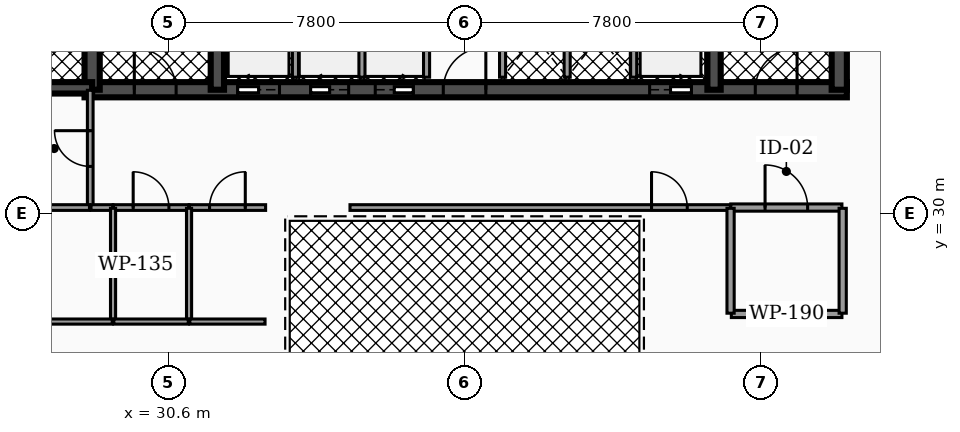
"""IFC4 building model, lengths in metres.
Left out: names, types, materials, properties, quantities, classifications, styles, units other than length and angle.
Written with IfcOpenShell. Run it as: python <this file> out.ifc"""

import sys

from ifc_helpers import new_model, si_unit, direction, frame, frame_2d, origin, place, context, subcontext, project, spatial, rectangle, extrude, element, fill, save


model = new_model("IFC4")
c1 = context("Model", 3, precision=1e-05, world=origin(), true_north=direction((0.0, 1.0)))
c2 = subcontext(c1, "Body", "Model", "MODEL_VIEW")
j1 = project(units=[si_unit("LENGTHUNIT", "METRE"), si_unit("PLANEANGLEUNIT", "RADIAN")], contexts=[c1])
p1 = place(None, origin())
s1 = spatial("IfcSite", under=j1, at=p1, CompositionType="ELEMENT")
p2 = place(p1, origin())
s2 = spatial("IfcBuilding", under=s1, at=p2, CompositionType="ELEMENT")
p3 = place(p2, frame((0.0, 0.0, 119.0)))
s3 = spatial("IfcBuildingStorey", under=s2, at=p3, CompositionType="ELEMENT", Elevation=119.0)
p4 = place(p3, frame((28.4, 33.25, 0.0), z_axis=(0.0, 0.0, 1.0), x_axis=(1.0, 0.0, 0.0)))
e1 = element("IfcWall", 1, at=p4, inside=s3, PredefinedType="SHEAR", context=c2, shape_type="SweptSolid", body=[
    extrude(rectangle(XDim=20.06, YDim=0.4, at=frame_2d((10.03, 0.0))), origin(), (0.0, 0.0, 1.0), 4.18),
])
p5 = place(p4, frame((4.03, 0.0, 0.0)))
e2 = element("IfcOpeningElement", 2, at=p5, cuts=e1, PredefinedType="OPENING", context=c2, shape_type="SweptSolid", body=[
    extrude(rectangle(XDim=1.1, YDim=2.15, at=frame_2d((0.55, 1.075))), frame((0.0, 0.21, 0.0), z_axis=(0.0, -1.0, 0.0), x_axis=(1.0, 0.0, 0.0)), (0.0, 0.0, 1.0), 0.42),
])
p6 = place(p4, frame((14.87, 0.0, 0.0)))
e3 = element("IfcOpeningElement", 3, at=p6, cuts=e1, PredefinedType="OPENING", context=c2, shape_type="SweptSolid", body=[
    extrude(rectangle(XDim=1.1, YDim=2.15, at=frame_2d((0.55, 1.075))), frame((0.0, 0.21, 0.0), z_axis=(0.0, -1.0, 0.0), x_axis=(1.0, 0.0, 0.0)), (0.0, 0.0, 1.0), 0.42),
])
p7 = place(p4, frame((5.95, 0.0, 0.0)))
e4 = element("IfcOpeningElement", 4, at=p7, cuts=e1, PredefinedType="OPENING", context=c2, shape_type="SweptSolid", body=[
    extrude(rectangle(XDim=1.0, YDim=2.1, at=frame_2d((0.5, 1.05))), frame((0.0, 0.21, 0.0), z_axis=(0.0, -1.0, 0.0), x_axis=(1.0, 0.0, 0.0)), (0.0, 0.0, 1.0), 0.42),
])
p8 = place(p4, frame((7.65, 0.0, 0.0)))
e5 = element("IfcOpeningElement", 5, at=p8, cuts=e1, PredefinedType="OPENING", context=c2, shape_type="SweptSolid", body=[
    extrude(rectangle(XDim=1.0, YDim=2.1, at=frame_2d((0.5, 1.05))), frame((0.0, 0.21, 0.0), z_axis=(0.0, -1.0, 0.0), x_axis=(1.0, 0.0, 0.0)), (0.0, 0.0, 1.0), 0.42),
])
p9 = place(p4, frame((1.31, 0.0, 0.0)))
e6 = element("IfcOpeningElement", 6, at=p9, cuts=e1, PredefinedType="OPENING", context=c2, shape_type="SweptSolid", body=[
    extrude(rectangle(XDim=1.1, YDim=2.2, at=frame_2d((0.55, 1.1))), frame((0.0, 0.21, 0.0), z_axis=(0.0, -1.0, 0.0), x_axis=(1.0, 0.0, 0.0)), (0.0, 0.0, 1.0), 0.42),
])
p10 = place(p4, frame((9.44, 0.0, 0.0)))
e7 = element("IfcOpeningElement", 7, at=p10, cuts=e1, PredefinedType="OPENING", context=c2, shape_type="SweptSolid", body=[
    extrude(rectangle(XDim=1.12, YDim=2.05, at=frame_2d((0.56, 1.025))), frame((0.0, 0.21, 0.0), z_axis=(0.0, -1.0, 0.0), x_axis=(1.0, 0.0, 0.0)), (0.0, 0.0, 1.0), 0.42),
])
p11 = place(p4, frame((17.65, 0.0, 0.0)))
e8 = element("IfcOpeningElement", 8, at=p11, cuts=e1, PredefinedType="OPENING", context=c2, shape_type="SweptSolid", body=[
    extrude(rectangle(XDim=1.1, YDim=2.2, at=frame_2d((0.55, 1.1))), frame((0.0, 0.21, 0.0), z_axis=(0.0, -1.0, 0.0), x_axis=(1.0, 0.0, 0.0)), (0.0, 0.0, 1.0), 0.42),
])
p12 = place(p3, frame((28.6, 33.25, 0.0), z_axis=(0.0, 0.0, 1.0), x_axis=(0.0, 1.0, 0.0)))
e9 = element("IfcWall", 9, at=p12, inside=s3, PredefinedType="SHEAR", context=c2, shape_type="SweptSolid", body=[
    extrude(rectangle(XDim=10.2, YDim=0.4, at=frame_2d((5.1, 0.0))), origin(), (0.0, 0.0, 1.0), 4.18),
])
for number, where, z_axis, x_axis in (
    (10, (31.895, 33.25, 0.0), (0.0, 0.0, 1.0), (0.0, 1.0, 0.0)),
    (11, (44.965, 33.25, 0.0), (0.0, 0.0, 1.0), (0.0, 1.0, 0.0)),
):
    element("IfcWall", number, at=place(p3, frame(where, z_axis=z_axis, x_axis=x_axis)), inside=s3, PredefinedType="SHEAR", context=c2, shape_type="SweptSolid", body=[
        extrude(rectangle(XDim=10.2, YDim=0.35, at=frame_2d((5.1, 0.0))), origin(), (0.0, 0.0, 1.0), 4.18),
    ])
p13 = place(p3, frame((48.26, 33.25, 0.0), z_axis=(0.0, 0.0, 1.0), x_axis=(0.0, 1.0, 0.0)))
e12 = element("IfcWall", 12, at=p13, inside=s3, PredefinedType="SHEAR", context=c2, shape_type="SweptSolid", body=[
    extrude(rectangle(XDim=10.2, YDim=0.4, at=frame_2d((5.1, 0.0))), origin(), (0.0, 0.0, 1.0), 4.18),
])
p14 = place(p3, frame((25.08, 33.3, 0.0), z_axis=(0.0, 0.0, 1.0), x_axis=(1.0, 0.0, 0.0)))
e13 = element("IfcWall", 13, at=p14, inside=s3, PredefinedType="SHEAR", context=c2, shape_type="SweptSolid", body=[
    extrude(rectangle(XDim=3.52, YDim=0.3, at=frame_2d((1.76, 0.0))), origin(), (0.0, 0.0, 1.0), 4.18),
])
p15 = place(p14, frame((1.335, 0.0, 0.0)))
e14 = element("IfcOpeningElement", 14, at=p15, cuts=e13, PredefinedType="OPENING", context=c2, shape_type="SweptSolid", body=[
    extrude(rectangle(XDim=0.95, YDim=2.2, at=frame_2d((0.475, 1.1))), frame((0.0, 0.16, 0.0), z_axis=(0.0, -1.0, 0.0), x_axis=(1.0, 0.0, 0.0)), (0.0, 0.0, 1.0), 0.32),
])
for number, where, z_axis, x_axis in (
    (15, (33.95, 33.58, 0.0), (0.0, 0.0, 1.0), (0.0, 1.0, 0.0)),
    (16, (42.85, 33.58, 0.0), (0.0, 0.0, 1.0), (0.0, 1.0, 0.0)),
):
    element("IfcWall", number, at=place(p3, frame(where, z_axis=z_axis, x_axis=x_axis)), inside=s3, PredefinedType="SOLIDWALL", context=c2, shape_type="SweptSolid", body=[
        extrude(rectangle(XDim=2.45, YDim=0.16, at=frame_2d((1.225, 0.0))), origin(), (0.0, 0.0, 1.0), 3.152),
    ])
for number, where, z_axis, x_axis in (
    (17, (35.7, 33.58, 0.0), (0.0, 0.0, 1.0), (0.0, 1.0, 0.0)),
    (18, (37.4, 33.58, 0.0), (0.0, 0.0, 1.0), (0.0, 1.0, 0.0)),
    (19, (39.4, 33.58, 0.0), (0.0, 0.0, 1.0), (0.0, 1.0, 0.0)),
    (20, (41.1, 33.58, 0.0), (0.0, 0.0, 1.0), (0.0, 1.0, 0.0)),
):
    element("IfcWall", number, at=place(p3, frame(where, z_axis=z_axis, x_axis=x_axis)), inside=s3, PredefinedType="SOLIDWALL", context=c2, shape_type="SweptSolid", body=[
        extrude(rectangle(XDim=2.25, YDim=0.16, at=frame_2d((1.125, 0.0))), origin(), (0.0, 0.0, 1.0), 3.152),
    ])
p16 = place(p3, frame((45.405, 30.15, 0.0), z_axis=(0.0, 0.0, 1.0), x_axis=(1.0, 0.0, 0.0)))
e21 = element("IfcWall", 21, at=p16, inside=s3, PredefinedType="PARTITIONING", context=c2, shape_type="SweptSolid", body=[
    extrude(rectangle(XDim=2.925, YDim=0.19, at=frame_2d((1.462, 0.0))), origin(), (0.0, 0.0, 1.0), 3.137),
])
p17 = place(p16, frame((0.903, 0.0, 0.0)))
e22 = element("IfcOpeningElement", 22, at=p17, cuts=e21, PredefinedType="OPENING", context=c2, shape_type="SweptSolid", body=[
    extrude(rectangle(XDim=1.12, YDim=2.05, at=frame_2d((0.56, 1.025))), frame((0.0, 0.105, 0.0), z_axis=(0.0, -1.0, 0.0), x_axis=(1.0, 0.0, 0.0)), (0.0, 0.0, 1.0), 0.21),
])
p18 = place(p3, frame((28.55, 30.17, 0.0), z_axis=(0.0, 0.0, 1.0), x_axis=(0.0, 1.0, 0.0)))
e23 = element("IfcWall", 23, at=p18, inside=s3, PredefinedType="PARTITIONING", context=c2, shape_type="SweptSolid", body=[
    extrude(rectangle(XDim=3.065, YDim=0.15, at=frame_2d((1.533, 0.0))), origin(), (0.0, 0.0, 1.0), 3.137),
])
p19 = place(p18, frame((1.062, 0.0, 0.0)))
e24 = element("IfcOpeningElement", 24, at=p19, cuts=e23, PredefinedType="OPENING", context=c2, shape_type="SweptSolid", body=[
    extrude(rectangle(XDim=0.94, YDim=2.05, at=frame_2d((0.47, 1.025))), frame((0.0, 0.085, 0.0), z_axis=(0.0, -1.0, 0.0), x_axis=(1.0, 0.0, 0.0)), (0.0, 0.0, 1.0), 0.17),
])
p20 = place(p3, frame((28.57, 30.15, 0.0), z_axis=(0.0, 0.0, 1.0), x_axis=(1.0, 0.0, 0.0)))
e25 = element("IfcWall", 25, at=p20, inside=s3, PredefinedType="PARTITIONING", context=c2, shape_type="SweptSolid", body=[
    extrude(rectangle(XDim=0.575, YDim=0.15, at=frame_2d((0.288, 0.0))), origin(), (0.0, 0.0, 1.0), 3.137),
])
p21 = place(p3, frame((29.155, 30.15, 0.0), z_axis=(0.0, 0.0, 1.0), x_axis=(1.0, 0.0, 0.0)))
e26 = element("IfcWall", 26, at=p21, inside=s3, PredefinedType="PARTITIONING", context=c2, shape_type="SweptSolid", body=[
    extrude(rectangle(XDim=1.99, YDim=0.15, at=frame_2d((0.995, 0.0))), origin(), (0.0, 0.0, 1.0), 3.137),
])
p22 = place(p21, frame((0.525, 0.0, 0.0)))
e27 = element("IfcOpeningElement", 27, at=p22, cuts=e26, PredefinedType="OPENING", context=c2, shape_type="SweptSolid", body=[
    extrude(rectangle(XDim=0.94, YDim=2.05, at=frame_2d((0.47, 1.025))), frame((0.0, 0.085, 0.0), z_axis=(0.0, -1.0, 0.0), x_axis=(1.0, 0.0, 0.0)), (0.0, 0.0, 1.0), 0.17),
])
p23 = place(p3, frame((31.155, 30.15, 0.0), z_axis=(0.0, 0.0, 1.0), x_axis=(1.0, 0.0, 0.0)))
e28 = element("IfcWall", 28, at=p23, inside=s3, PredefinedType="PARTITIONING", context=c2, shape_type="SweptSolid", body=[
    extrude(rectangle(XDim=2.01, YDim=0.15, at=frame_2d((1.005, 0.0))), origin(), (0.0, 0.0, 1.0), 3.137),
])
p24 = place(p23, frame((0.535, 0.0, 0.0)))
e29 = element("IfcOpeningElement", 29, at=p24, cuts=e28, PredefinedType="OPENING", context=c2, shape_type="SweptSolid", body=[
    extrude(rectangle(XDim=0.94, YDim=2.05, at=frame_2d((0.47, 1.025))), frame((0.0, 0.085, 0.0), z_axis=(0.0, -1.0, 0.0), x_axis=(1.0, 0.0, 0.0)), (0.0, 0.0, 1.0), 0.17),
])
p25 = place(p3, frame((35.385, 30.15, 0.0), z_axis=(0.0, 0.0, 1.0), x_axis=(1.0, 0.0, 0.0)))
e30 = element("IfcWall", 30, at=p25, inside=s3, PredefinedType="PARTITIONING", context=c2, shape_type="SweptSolid", body=[
    extrude(rectangle(XDim=10.01, YDim=0.15, at=frame_2d((5.005, 0.0))), origin(), (0.0, 0.0, 1.0), 3.137),
])
p26 = place(p25, frame((7.935, 0.0, 0.0)))
e31 = element("IfcOpeningElement", 31, at=p26, cuts=e30, PredefinedType="OPENING", context=c2, shape_type="SweptSolid", body=[
    extrude(rectangle(XDim=0.94, YDim=2.05, at=frame_2d((0.47, 1.025))), frame((0.0, 0.085, 0.0), z_axis=(0.0, -1.0, 0.0), x_axis=(1.0, 0.0, 0.0)), (0.0, 0.0, 1.0), 0.17),
])
p27 = place(p3, frame((45.42, 27.35, 0.0), z_axis=(0.0, 0.0, 1.0), x_axis=(1.0, 0.0, 0.0)))
e32 = element("IfcWall", 32, at=p27, inside=s3, PredefinedType="PARTITIONING", context=c2, shape_type="SweptSolid", body=[
    extrude(rectangle(XDim=2.91, YDim=0.19, at=frame_2d((1.455, 0.0))), origin(), (0.0, 0.0, 1.0), 3.137),
])
for number, where, z_axis, x_axis in (
    (33, (45.4, 27.37, 0.0), (0.0, 0.0, 1.0), (0.0, 1.0, 0.0)),
    (34, (48.35, 27.37, 0.0), (0.0, 0.0, 1.0), (0.0, 1.0, 0.0)),
):
    element("IfcWall", number, at=place(p3, frame(where, z_axis=z_axis, x_axis=x_axis)), inside=s3, PredefinedType="PARTITIONING", context=c2, shape_type="SweptSolid", body=[
        extrude(rectangle(XDim=2.76, YDim=0.19, at=frame_2d((1.38, 0.0))), origin(), (0.0, 0.0, 1.0), 3.137),
    ])
p28 = place(p3, frame((27.155, 30.15, 0.0), z_axis=(0.0, 0.0, 1.0), x_axis=(1.0, 0.0, 0.0)))
e35 = element("IfcWall", 35, at=p28, inside=s3, PredefinedType="PARTITIONING", context=c2, shape_type="SweptSolid", body=[
    extrude(rectangle(XDim=1.375, YDim=0.15, at=frame_2d((0.688, 0.0))), origin(), (0.0, 0.0, 1.0), 3.137),
])
p29 = place(p3, frame((29.15, 27.17, 0.0), z_axis=(0.0, 0.0, 1.0), x_axis=(0.0, 1.0, 0.0)))
e36 = element("IfcWall", 36, at=p29, inside=s3, PredefinedType="PARTITIONING", context=c2, shape_type="SweptSolid", body=[
    extrude(rectangle(XDim=2.96, YDim=0.135, at=frame_2d((1.48, 0.0))), origin(), (0.0, 0.0, 1.0), 3.137),
])
p30 = place(p3, frame((27.17, 27.15, 0.0), z_axis=(0.0, 0.0, 1.0), x_axis=(1.0, 0.0, 0.0)))
e37 = element("IfcWall", 37, at=p30, inside=s3, PredefinedType="PARTITIONING", context=c2, shape_type="SweptSolid", body=[
    extrude(rectangle(XDim=1.96, YDim=0.135, at=frame_2d((0.98, 0.0))), origin(), (0.0, 0.0, 1.0), 3.137),
])
p31 = place(p3, frame((31.15, 27.17, 0.0), z_axis=(0.0, 0.0, 1.0), x_axis=(0.0, 1.0, 0.0)))
e38 = element("IfcWall", 38, at=p31, inside=s3, PredefinedType="PARTITIONING", context=c2, shape_type="SweptSolid", body=[
    extrude(rectangle(XDim=2.96, YDim=0.135, at=frame_2d((1.48, 0.0))), origin(), (0.0, 0.0, 1.0), 3.137),
])
p32 = place(p3, frame((29.17, 27.15, 0.0), z_axis=(0.0, 0.0, 1.0), x_axis=(1.0, 0.0, 0.0)))
e39 = element("IfcWall", 39, at=p32, inside=s3, PredefinedType="PARTITIONING", context=c2, shape_type="SweptSolid", body=[
    extrude(rectangle(XDim=1.96, YDim=0.135, at=frame_2d((0.98, 0.0))), origin(), (0.0, 0.0, 1.0), 3.137),
])
p33 = place(p3, frame((31.17, 27.15, 0.0), z_axis=(0.0, 0.0, 1.0), x_axis=(1.0, 0.0, 0.0)))
e40 = element("IfcWall", 40, at=p33, inside=s3, PredefinedType="PARTITIONING", context=c2, shape_type="SweptSolid", body=[
    extrude(rectangle(XDim=1.98, YDim=0.135, at=frame_2d((0.99, 0.0))), origin(), (0.0, 0.0, 1.0), 3.137),
])
p34 = place(p5, origin())
e41 = element("IfcDoor", 41, at=p34, inside=s3, OperationType="SLIDING_TO_LEFT", PredefinedType="DOOR", context=c2, shape_type="SweptSolid", body=[
    extrude(rectangle(XDim=1.1, YDim=2.15, at=frame_2d((0.55, 1.075))), frame((0.0, 0.025, 0.0), z_axis=(0.0, -1.0, 0.0), x_axis=(1.0, 0.0, 0.0)), (0.0, 0.0, 1.0), 0.05),
])
fill(e2, e41)
p35 = place(p6, origin())
e42 = element("IfcDoor", 42, at=p35, inside=s3, OperationType="SLIDING_TO_RIGHT", PredefinedType="DOOR", context=c2, shape_type="SweptSolid", body=[
    extrude(rectangle(XDim=1.1, YDim=2.15, at=frame_2d((0.55, 1.075))), frame((0.0, 0.025, 0.0), z_axis=(0.0, -1.0, 0.0), x_axis=(1.0, 0.0, 0.0)), (0.0, 0.0, 1.0), 0.05),
])
fill(e3, e42)
p36 = place(p7, origin())
e43 = element("IfcDoor", 43, at=p36, inside=s3, OperationType="SLIDING_TO_LEFT", PredefinedType="DOOR", context=c2, shape_type="SweptSolid", body=[
    extrude(rectangle(XDim=1.0, YDim=2.1, at=frame_2d((0.5, 1.05))), frame((0.0, 0.025, 0.0), z_axis=(0.0, -1.0, 0.0), x_axis=(1.0, 0.0, 0.0)), (0.0, 0.0, 1.0), 0.05),
])
fill(e4, e43)
p37 = place(p8, origin())
e44 = element("IfcDoor", 44, at=p37, inside=s3, OperationType="SLIDING_TO_RIGHT", PredefinedType="DOOR", context=c2, shape_type="SweptSolid", body=[
    extrude(rectangle(XDim=1.0, YDim=2.1, at=frame_2d((0.5, 1.05))), frame((0.0, 0.025, 0.0), z_axis=(0.0, -1.0, 0.0), x_axis=(1.0, 0.0, 0.0)), (0.0, 0.0, 1.0), 0.05),
])
fill(e5, e44)
p38 = place(p9, origin())
e45 = element("IfcDoor", 45, at=p38, inside=s3, OperationType="SINGLE_SWING_LEFT", PredefinedType="DOOR", context=c2, shape_type="SweptSolid", body=[
    extrude(rectangle(XDim=1.1, YDim=2.2, at=frame_2d((0.55, 1.1))), frame((0.0, 0.025, 0.0), z_axis=(0.0, -1.0, 0.0), x_axis=(1.0, 0.0, 0.0)), (0.0, 0.0, 1.0), 0.05),
])
fill(e6, e45)
p39 = place(p10, origin())
e46 = element("IfcDoor", 46, at=p39, inside=s3, OperationType="SINGLE_SWING_RIGHT", PredefinedType="DOOR", context=c2, shape_type="SweptSolid", body=[
    extrude(rectangle(XDim=1.12, YDim=2.05, at=frame_2d((0.56, 1.025))), frame((0.0, 0.025, 0.0), z_axis=(0.0, -1.0, 0.0), x_axis=(1.0, 0.0, 0.0)), (0.0, 0.0, 1.0), 0.05),
])
fill(e7, e46)
p40 = place(p11, origin())
e47 = element("IfcDoor", 47, at=p40, inside=s3, OperationType="SINGLE_SWING_RIGHT", PredefinedType="DOOR", context=c2, shape_type="SweptSolid", body=[
    extrude(rectangle(XDim=1.1, YDim=2.2, at=frame_2d((0.55, 1.1))), frame((0.0, 0.025, 0.0), z_axis=(0.0, -1.0, 0.0), x_axis=(1.0, 0.0, 0.0)), (0.0, 0.0, 1.0), 0.05),
])
fill(e8, e47)
p41 = place(p17, origin())
e48 = element("IfcDoor", 48, at=p41, inside=s3, OperationType="SINGLE_SWING_LEFT", PredefinedType="DOOR", context=c2, shape_type="SweptSolid", body=[
    extrude(rectangle(XDim=1.12, YDim=2.05, at=frame_2d((0.56, 1.025))), frame((0.0, 0.025, 0.0), z_axis=(0.0, -1.0, 0.0), x_axis=(1.0, 0.0, 0.0)), (0.0, 0.0, 1.0), 0.05),
])
fill(e22, e48)
p42 = place(p19, origin())
e49 = element("IfcDoor", 49, at=p42, inside=s3, OperationType="SINGLE_SWING_RIGHT", PredefinedType="DOOR", context=c2, shape_type="SweptSolid", body=[
    extrude(rectangle(XDim=0.94, YDim=2.05, at=frame_2d((0.47, 1.025))), frame((0.0, 0.025, 0.0), z_axis=(0.0, -1.0, 0.0), x_axis=(1.0, 0.0, 0.0)), (0.0, 0.0, 1.0), 0.05),
])
fill(e24, e49)
p43 = place(p22, origin())
e50 = element("IfcDoor", 50, at=p43, inside=s3, OperationType="SINGLE_SWING_LEFT", PredefinedType="DOOR", context=c2, shape_type="SweptSolid", body=[
    extrude(rectangle(XDim=0.94, YDim=2.05, at=frame_2d((0.47, 1.025))), frame((0.0, 0.025, 0.0), z_axis=(0.0, -1.0, 0.0), x_axis=(1.0, 0.0, 0.0)), (0.0, 0.0, 1.0), 0.05),
])
fill(e27, e50)
p44 = place(p24, origin())
e51 = element("IfcDoor", 51, at=p44, inside=s3, OperationType="SINGLE_SWING_RIGHT", PredefinedType="DOOR", context=c2, shape_type="SweptSolid", body=[
    extrude(rectangle(XDim=0.94, YDim=2.05, at=frame_2d((0.47, 1.025))), frame((0.0, 0.025, 0.0), z_axis=(0.0, -1.0, 0.0), x_axis=(1.0, 0.0, 0.0)), (0.0, 0.0, 1.0), 0.05),
])
fill(e29, e51)
p45 = place(p26, origin())
e52 = element("IfcDoor", 52, at=p45, inside=s3, OperationType="SINGLE_SWING_LEFT", PredefinedType="DOOR", context=c2, shape_type="SweptSolid", body=[
    extrude(rectangle(XDim=0.94, YDim=2.05, at=frame_2d((0.47, 1.025))), frame((0.0, 0.025, 0.0), z_axis=(0.0, -1.0, 0.0), x_axis=(1.0, 0.0, 0.0)), (0.0, 0.0, 1.0), 0.05),
])
fill(e31, e52)
save(model, sys.argv[1])
